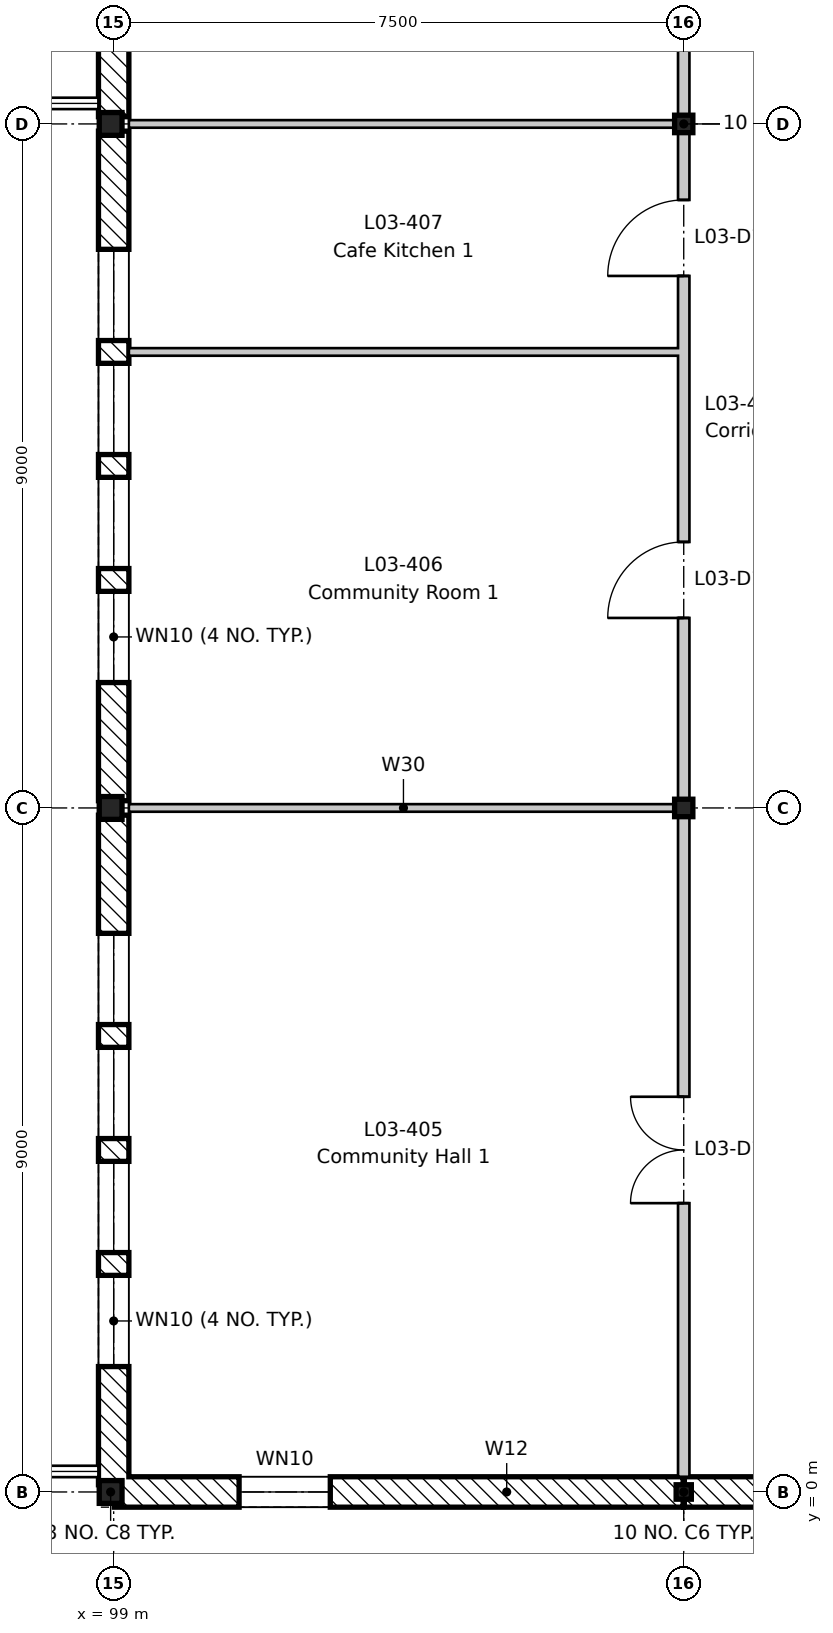
"""IFC4 building model, lengths in metres.
Left out: names, types, materials, properties, quantities, classifications, styles, units other than length and angle.
Written with IfcOpenShell. Run it as: python <this file> out.ifc"""

import sys

from ifc_helpers import new_model, si_unit, direction, frame, frame_2d, origin, origin_2d, place, context, subcontext, project, spatial, rectangle, i_section, extrude, element, fill, save


model = new_model("IFC4")
c1 = context("Model", 3, precision=1e-05, world=origin(), true_north=direction((0.0, 1.0)))
c2 = subcontext(c1, "Body", "Model", "MODEL_VIEW")
j1 = project(units=[si_unit("LENGTHUNIT", "METRE"), si_unit("PLANEANGLEUNIT", "RADIAN")], contexts=[c1])
p1 = place(None, origin())
s1 = spatial("IfcSite", under=j1, at=p1, CompositionType="ELEMENT")
p2 = place(p1, origin())
s2 = spatial("IfcBuilding", under=s1, at=p2, CompositionType="ELEMENT")
p3 = place(p2, frame((0.0, 0.0, 14.4)))
s3 = spatial("IfcBuildingStorey", under=s2, at=p3, CompositionType="ELEMENT", Elevation=14.4)
for number, where, z_axis, x_axis in (
    (1, (99.0, 0.0, -0.2), (0.0, 0.0, 1.0), (1.0, 0.0, 0.0)),
    (2, (99.0, 9.0, -0.2), (0.0, 0.0, 1.0), (1.0, 0.0, 0.0)),
    (3, (99.0, 18.0, -0.2), (0.0, 0.0, 1.0), (1.0, 0.0, 0.0)),
    (4, (106.5, 0.0, -0.2), (0.0, 0.0, 1.0), (1.0, 0.0, 0.0)),
):
    element("IfcColumn", number, at=place(p3, frame(where, z_axis=z_axis, x_axis=x_axis)), inside=s3, PredefinedType="COLUMN", context=c2, shape_type="SweptSolid", body=[
        extrude(i_section(OverallWidth=0.2, OverallDepth=0.19, WebThickness=0.007, FlangeThickness=0.01, FilletRadius=0.018, at=origin_2d()), origin(), (0.0, 0.0, 1.0), 4.15),
    ])
for number, where, z_axis, x_axis in (
    (5, (106.5, 9.0, -0.2), (0.0, 0.0, 1.0), (1.0, 0.0, 0.0)),
    (6, (106.5, 18.0, -0.2), (0.0, 0.0, 1.0), (1.0, 0.0, 0.0)),
):
    element("IfcColumn", number, at=place(p3, frame(where, z_axis=z_axis, x_axis=x_axis)), inside=s3, PredefinedType="COLUMN", context=c2, shape_type="SweptSolid", body=[
        extrude(i_section(OverallWidth=0.24, OverallDepth=0.23, WebThickness=0.008, FlangeThickness=0.012, FilletRadius=0.021, at=origin_2d()), origin(), (0.0, 0.0, 1.0), 4.15),
    ])
for number, where, z_axis, x_axis in (
    (7, (98.96, 0.0, 3.95), (0.0, 0.0, 1.0), (1.0, 0.0, 0.0)),
    (8, (98.96, 9.0, 3.95), (0.0, 0.0, 1.0), (1.0, 0.0, 0.0)),
    (9, (98.96, 18.0, 3.95), (0.0, 0.0, 1.0), (1.0, 0.0, 0.0)),
):
    element("IfcColumn", number, at=place(p3, frame(where, z_axis=z_axis, x_axis=x_axis)), inside=s3, PredefinedType="COLUMN", context=c2, shape_type="SweptSolid", body=[
        extrude(i_section(OverallWidth=0.3, OverallDepth=0.3, WebThickness=0.011, FlangeThickness=0.019, FilletRadius=0.027, at=origin_2d()), origin(), (0.0, 0.0, 1.0), 0.25),
    ])
p4 = place(p3, frame((99.0, 0.095, 0.0), z_axis=(0.0, 0.0, 1.0), x_axis=(0.0, 1.0, 0.0)))
e10 = element("IfcWall", 10, at=p4, inside=s3, PredefinedType="STANDARD", context=c2, shape_type="SweptSolid", body=[
    extrude(rectangle(XDim=8.81, YDim=0.4, at=frame_2d((4.405, 0.0))), origin(), (0.0, 0.0, 1.0), 3.55),
])
p5 = place(p4, frame((1.555, 0.0, 0.6)))
e11 = element("IfcOpeningElement", 11, at=p5, cuts=e10, PredefinedType="OPENING", context=c2, shape_type="SweptSolid", body=[
    extrude(rectangle(XDim=1.2, YDim=1.8, at=frame_2d((0.6, 0.9))), frame((0.0, 0.21, 0.0), z_axis=(0.0, -1.0, 0.0), x_axis=(1.0, 0.0, 0.0)), (0.0, 0.0, 1.0), 0.42),
])
p6 = place(p4, frame((3.055, 0.0, 0.6)))
e12 = element("IfcOpeningElement", 12, at=p6, cuts=e10, PredefinedType="OPENING", context=c2, shape_type="SweptSolid", body=[
    extrude(rectangle(XDim=1.2, YDim=1.8, at=frame_2d((0.6, 0.9))), frame((0.0, 0.21, 0.0), z_axis=(0.0, -1.0, 0.0), x_axis=(1.0, 0.0, 0.0)), (0.0, 0.0, 1.0), 0.42),
])
p7 = place(p4, frame((4.555, 0.0, 0.6)))
e13 = element("IfcOpeningElement", 13, at=p7, cuts=e10, PredefinedType="OPENING", context=c2, shape_type="SweptSolid", body=[
    extrude(rectangle(XDim=1.2, YDim=1.8, at=frame_2d((0.6, 0.9))), frame((0.0, 0.21, 0.0), z_axis=(0.0, -1.0, 0.0), x_axis=(1.0, 0.0, 0.0)), (0.0, 0.0, 1.0), 0.42),
])
p8 = place(p4, frame((6.055, 0.0, 0.6)))
e14 = element("IfcOpeningElement", 14, at=p8, cuts=e10, PredefinedType="OPENING", context=c2, shape_type="SweptSolid", body=[
    extrude(rectangle(XDim=1.2, YDim=1.8, at=frame_2d((0.6, 0.9))), frame((0.0, 0.21, 0.0), z_axis=(0.0, -1.0, 0.0), x_axis=(1.0, 0.0, 0.0)), (0.0, 0.0, 1.0), 0.42),
])
p9 = place(p3, frame((99.0, 9.095, 0.0), z_axis=(0.0, 0.0, 1.0), x_axis=(0.0, 1.0, 0.0)))
e15 = element("IfcWall", 15, at=p9, inside=s3, PredefinedType="STANDARD", context=c2, shape_type="SweptSolid", body=[
    extrude(rectangle(XDim=8.81, YDim=0.4, at=frame_2d((4.405, 0.0))), origin(), (0.0, 0.0, 1.0), 3.55),
])
p10 = place(p9, frame((1.555, 0.0, 0.6)))
e16 = element("IfcOpeningElement", 16, at=p10, cuts=e15, PredefinedType="OPENING", context=c2, shape_type="SweptSolid", body=[
    extrude(rectangle(XDim=1.2, YDim=1.8, at=frame_2d((0.6, 0.9))), frame((0.0, 0.21, 0.0), z_axis=(0.0, -1.0, 0.0), x_axis=(1.0, 0.0, 0.0)), (0.0, 0.0, 1.0), 0.42),
])
p11 = place(p9, frame((3.055, 0.0, 0.6)))
e17 = element("IfcOpeningElement", 17, at=p11, cuts=e15, PredefinedType="OPENING", context=c2, shape_type="SweptSolid", body=[
    extrude(rectangle(XDim=1.2, YDim=1.8, at=frame_2d((0.6, 0.9))), frame((0.0, 0.21, 0.0), z_axis=(0.0, -1.0, 0.0), x_axis=(1.0, 0.0, 0.0)), (0.0, 0.0, 1.0), 0.42),
])
p12 = place(p9, frame((4.555, 0.0, 0.6)))
e18 = element("IfcOpeningElement", 18, at=p12, cuts=e15, PredefinedType="OPENING", context=c2, shape_type="SweptSolid", body=[
    extrude(rectangle(XDim=1.2, YDim=1.8, at=frame_2d((0.6, 0.9))), frame((0.0, 0.21, 0.0), z_axis=(0.0, -1.0, 0.0), x_axis=(1.0, 0.0, 0.0)), (0.0, 0.0, 1.0), 0.42),
])
p13 = place(p9, frame((6.055, 0.0, 0.6)))
e19 = element("IfcOpeningElement", 19, at=p13, cuts=e15, PredefinedType="OPENING", context=c2, shape_type="SweptSolid", body=[
    extrude(rectangle(XDim=1.2, YDim=1.8, at=frame_2d((0.6, 0.9))), frame((0.0, 0.21, 0.0), z_axis=(0.0, -1.0, 0.0), x_axis=(1.0, 0.0, 0.0)), (0.0, 0.0, 1.0), 0.42),
])
p14 = place(p3, frame((99.0, 18.095, 0.0), z_axis=(0.0, 0.0, 1.0), x_axis=(0.0, 1.0, 0.0)))
e20 = element("IfcWall", 20, at=p14, inside=s3, PredefinedType="STANDARD", context=c2, shape_type="SweptSolid", body=[
    extrude(rectangle(XDim=8.81, YDim=0.4, at=frame_2d((4.405, 0.0))), origin(), (0.0, 0.0, 1.0), 3.55),
])
p15 = place(p14, frame((1.555, 0.0, 0.6)))
e21 = element("IfcOpeningElement", 21, at=p15, cuts=e20, PredefinedType="OPENING", context=c2, shape_type="SweptSolid", body=[
    extrude(rectangle(XDim=1.2, YDim=1.8, at=frame_2d((0.6, 0.9))), frame((0.0, 0.21, 0.0), z_axis=(0.0, -1.0, 0.0), x_axis=(1.0, 0.0, 0.0)), (0.0, 0.0, 1.0), 0.42),
])
p16 = place(p14, frame((3.055, 0.0, 0.6)))
e22 = element("IfcOpeningElement", 22, at=p16, cuts=e20, PredefinedType="OPENING", context=c2, shape_type="SweptSolid", body=[
    extrude(rectangle(XDim=1.2, YDim=1.8, at=frame_2d((0.6, 0.9))), frame((0.0, 0.21, 0.0), z_axis=(0.0, -1.0, 0.0), x_axis=(1.0, 0.0, 0.0)), (0.0, 0.0, 1.0), 0.42),
])
p17 = place(p14, frame((4.555, 0.0, 0.6)))
e23 = element("IfcOpeningElement", 23, at=p17, cuts=e20, PredefinedType="OPENING", context=c2, shape_type="SweptSolid", body=[
    extrude(rectangle(XDim=1.2, YDim=1.8, at=frame_2d((0.6, 0.9))), frame((0.0, 0.21, 0.0), z_axis=(0.0, -1.0, 0.0), x_axis=(1.0, 0.0, 0.0)), (0.0, 0.0, 1.0), 0.42),
])
p18 = place(p14, frame((6.055, 0.0, 0.6)))
e24 = element("IfcOpeningElement", 24, at=p18, cuts=e20, PredefinedType="OPENING", context=c2, shape_type="SweptSolid", body=[
    extrude(rectangle(XDim=1.2, YDim=1.8, at=frame_2d((0.6, 0.9))), frame((0.0, 0.21, 0.0), z_axis=(0.0, -1.0, 0.0), x_axis=(1.0, 0.0, 0.0)), (0.0, 0.0, 1.0), 0.42),
])
p19 = place(p3, frame((106.492, 0.0, 0.0), z_axis=(0.0, 0.0, 1.0), x_axis=(-1.0, 0.0, 0.0)))
e25 = element("IfcWall", 25, at=p19, inside=s3, PredefinedType="STANDARD", context=c2, shape_type="SweptSolid", body=[
    extrude(rectangle(XDim=7.483, YDim=0.4, at=frame_2d((3.742, 0.0))), origin(), (0.0, 0.0, 1.0), 3.62),
])
p20 = place(p19, frame((4.642, 0.0, 0.6)))
e26 = element("IfcOpeningElement", 26, at=p20, cuts=e25, PredefinedType="OPENING", context=c2, shape_type="SweptSolid", body=[
    extrude(rectangle(XDim=1.2, YDim=1.8, at=frame_2d((0.6, 0.9))), frame((0.0, 0.21, 0.0), z_axis=(0.0, -1.0, 0.0), x_axis=(1.0, 0.0, 0.0)), (0.0, 0.0, 1.0), 0.42),
])
p21 = place(p3, frame((109.492, 0.0, 0.0), z_axis=(0.0, 0.0, 1.0), x_axis=(-1.0, 0.0, 0.0)))
e27 = element("IfcWall", 27, at=p21, inside=s3, PredefinedType="STANDARD", context=c2, shape_type="SweptSolid", body=[
    extrude(rectangle(XDim=2.983, YDim=0.4, at=frame_2d((1.492, 0.0))), origin(), (0.0, 0.0, 1.0), 3.75),
])
p22 = place(p3, frame((99.2, 9.0, 0.0), z_axis=(0.0, 0.0, 1.0), x_axis=(1.0, 0.0, 0.0)))
e28 = element("IfcWall", 28, at=p22, inside=s3, PredefinedType="PARTITIONING", context=c2, shape_type="SweptSolid", body=[
    extrude(rectangle(XDim=7.225, YDim=0.1, at=frame_2d((3.613, 0.0))), origin(), (0.0, 0.0, 1.0), 3.6),
])
p23 = place(p3, frame((99.2, 15.0, 0.0), z_axis=(0.0, 0.0, 1.0), x_axis=(1.0, 0.0, 0.0)))
e29 = element("IfcWall", 29, at=p23, inside=s3, PredefinedType="PARTITIONING", context=c2, shape_type="SweptSolid", body=[
    extrude(rectangle(XDim=7.225, YDim=0.1, at=frame_2d((3.613, 0.0))), origin(), (0.0, 0.0, 1.0), 3.95),
])
p24 = place(p3, frame((99.2, 18.0, 0.0), z_axis=(0.0, 0.0, 1.0), x_axis=(1.0, 0.0, 0.0)))
e30 = element("IfcWall", 30, at=p24, inside=s3, PredefinedType="PARTITIONING", context=c2, shape_type="SweptSolid", body=[
    extrude(rectangle(XDim=7.225, YDim=0.1, at=frame_2d((3.613, 0.0))), origin(), (0.0, 0.0, 1.0), 3.6),
])
p25 = place(p3, frame((106.5, 0.2, 0.0), z_axis=(0.0, 0.0, 1.0), x_axis=(0.0, 1.0, 0.0)))
e31 = element("IfcWall", 31, at=p25, inside=s3, PredefinedType="PARTITIONING", context=c2, shape_type="SweptSolid", body=[
    extrude(rectangle(XDim=53.6, YDim=0.15, at=frame_2d((26.8, 0.0))), origin(), (0.0, 0.0, 1.0), 3.43),
])
p26 = place(p25, frame((3.6, 0.0, 0.0)))
e32 = element("IfcOpeningElement", 32, at=p26, cuts=e31, PredefinedType="OPENING", context=c2, shape_type="SweptSolid", body=[
    extrude(rectangle(XDim=1.4, YDim=2.1, at=frame_2d((0.7, 1.05))), frame((0.0, 0.085, 0.0), z_axis=(0.0, -1.0, 0.0), x_axis=(1.0, 0.0, 0.0)), (0.0, 0.0, 1.0), 0.17),
])
p27 = place(p25, frame((11.3, 0.0, 0.0)))
e33 = element("IfcOpeningElement", 33, at=p27, cuts=e31, PredefinedType="OPENING", context=c2, shape_type="SweptSolid", body=[
    extrude(rectangle(XDim=1.0, YDim=2.1, at=frame_2d((0.5, 1.05))), frame((0.0, 0.085, 0.0), z_axis=(0.0, -1.0, 0.0), x_axis=(1.0, 0.0, 0.0)), (0.0, 0.0, 1.0), 0.17),
])
p28 = place(p25, frame((15.8, 0.0, 0.0)))
e34 = element("IfcOpeningElement", 34, at=p28, cuts=e31, PredefinedType="OPENING", context=c2, shape_type="SweptSolid", body=[
    extrude(rectangle(XDim=1.0, YDim=2.1, at=frame_2d((0.5, 1.05))), frame((0.0, 0.085, 0.0), z_axis=(0.0, -1.0, 0.0), x_axis=(1.0, 0.0, 0.0)), (0.0, 0.0, 1.0), 0.17),
])
p29 = place(p25, frame((21.6, 0.0, 0.0)))
e35 = element("IfcOpeningElement", 35, at=p29, cuts=e31, PredefinedType="OPENING", context=c2, shape_type="SweptSolid", body=[
    extrude(rectangle(XDim=1.4, YDim=2.1, at=frame_2d((0.7, 1.05))), frame((0.0, 0.085, 0.0), z_axis=(0.0, -1.0, 0.0), x_axis=(1.0, 0.0, 0.0)), (0.0, 0.0, 1.0), 0.17),
])
p30 = place(p25, frame((29.3, 0.0, 0.0)))
e36 = element("IfcOpeningElement", 36, at=p30, cuts=e31, PredefinedType="OPENING", context=c2, shape_type="SweptSolid", body=[
    extrude(rectangle(XDim=1.0, YDim=2.1, at=frame_2d((0.5, 1.05))), frame((0.0, 0.085, 0.0), z_axis=(0.0, -1.0, 0.0), x_axis=(1.0, 0.0, 0.0)), (0.0, 0.0, 1.0), 0.17),
])
p31 = place(p25, frame((36.6, 0.0, 0.0)))
e37 = element("IfcOpeningElement", 37, at=p31, cuts=e31, PredefinedType="OPENING", context=c2, shape_type="SweptSolid", body=[
    extrude(rectangle(XDim=1.4, YDim=2.1, at=frame_2d((0.7, 1.05))), frame((0.0, 0.085, 0.0), z_axis=(0.0, -1.0, 0.0), x_axis=(1.0, 0.0, 0.0)), (0.0, 0.0, 1.0), 0.17),
])
p32 = place(p25, frame((45.55, 0.0, 0.0)))
e38 = element("IfcOpeningElement", 38, at=p32, cuts=e31, PredefinedType="OPENING", context=c2, shape_type="SweptSolid", body=[
    extrude(rectangle(XDim=1.0, YDim=2.1, at=frame_2d((0.5, 1.05))), frame((0.0, 0.085, 0.0), z_axis=(0.0, -1.0, 0.0), x_axis=(1.0, 0.0, 0.0)), (0.0, 0.0, 1.0), 0.17),
])
p33 = place(p25, frame((48.8, 0.0, 0.0)))
e39 = element("IfcOpeningElement", 39, at=p33, cuts=e31, PredefinedType="OPENING", context=c2, shape_type="SweptSolid", body=[
    extrude(rectangle(XDim=1.0, YDim=2.1, at=frame_2d((0.5, 1.05))), frame((0.0, 0.085, 0.0), z_axis=(0.0, -1.0, 0.0), x_axis=(1.0, 0.0, 0.0)), (0.0, 0.0, 1.0), 0.17),
])
p34 = place(p25, frame((51.8, 0.0, 0.0)))
e40 = element("IfcOpeningElement", 40, at=p34, cuts=e31, PredefinedType="OPENING", context=c2, shape_type="SweptSolid", body=[
    extrude(rectangle(XDim=1.0, YDim=2.1, at=frame_2d((0.5, 1.05))), frame((0.0, 0.085, 0.0), z_axis=(0.0, -1.0, 0.0), x_axis=(1.0, 0.0, 0.0)), (0.0, 0.0, 1.0), 0.17),
])
p35 = place(p5, origin())
e41 = element("IfcWindow", 41, at=p35, inside=s3, PartitioningType="SINGLE_PANEL", PredefinedType="WINDOW", context=c2, shape_type="SweptSolid", body=[
    extrude(rectangle(XDim=1.2, YDim=1.8, at=frame_2d((0.6, 0.9))), frame((0.0, 0.03, 0.0), z_axis=(0.0, -1.0, 0.0), x_axis=(1.0, 0.0, 0.0)), (0.0, 0.0, 1.0), 0.06),
])
fill(e11, e41)
p36 = place(p6, origin())
e42 = element("IfcWindow", 42, at=p36, inside=s3, PartitioningType="SINGLE_PANEL", PredefinedType="WINDOW", context=c2, shape_type="SweptSolid", body=[
    extrude(rectangle(XDim=1.2, YDim=1.8, at=frame_2d((0.6, 0.9))), frame((0.0, 0.03, 0.0), z_axis=(0.0, -1.0, 0.0), x_axis=(1.0, 0.0, 0.0)), (0.0, 0.0, 1.0), 0.06),
])
fill(e12, e42)
p37 = place(p7, origin())
e43 = element("IfcWindow", 43, at=p37, inside=s3, PartitioningType="SINGLE_PANEL", PredefinedType="WINDOW", context=c2, shape_type="SweptSolid", body=[
    extrude(rectangle(XDim=1.2, YDim=1.8, at=frame_2d((0.6, 0.9))), frame((0.0, 0.03, 0.0), z_axis=(0.0, -1.0, 0.0), x_axis=(1.0, 0.0, 0.0)), (0.0, 0.0, 1.0), 0.06),
])
fill(e13, e43)
p38 = place(p8, origin())
e44 = element("IfcWindow", 44, at=p38, inside=s3, PartitioningType="SINGLE_PANEL", PredefinedType="WINDOW", context=c2, shape_type="SweptSolid", body=[
    extrude(rectangle(XDim=1.2, YDim=1.8, at=frame_2d((0.6, 0.9))), frame((0.0, 0.03, 0.0), z_axis=(0.0, -1.0, 0.0), x_axis=(1.0, 0.0, 0.0)), (0.0, 0.0, 1.0), 0.06),
])
fill(e14, e44)
p39 = place(p10, origin())
e45 = element("IfcWindow", 45, at=p39, inside=s3, PartitioningType="SINGLE_PANEL", PredefinedType="WINDOW", context=c2, shape_type="SweptSolid", body=[
    extrude(rectangle(XDim=1.2, YDim=1.8, at=frame_2d((0.6, 0.9))), frame((0.0, 0.03, 0.0), z_axis=(0.0, -1.0, 0.0), x_axis=(1.0, 0.0, 0.0)), (0.0, 0.0, 1.0), 0.06),
])
fill(e16, e45)
p40 = place(p11, origin())
e46 = element("IfcWindow", 46, at=p40, inside=s3, PartitioningType="SINGLE_PANEL", PredefinedType="WINDOW", context=c2, shape_type="SweptSolid", body=[
    extrude(rectangle(XDim=1.2, YDim=1.8, at=frame_2d((0.6, 0.9))), frame((0.0, 0.03, 0.0), z_axis=(0.0, -1.0, 0.0), x_axis=(1.0, 0.0, 0.0)), (0.0, 0.0, 1.0), 0.06),
])
fill(e17, e46)
p41 = place(p12, origin())
e47 = element("IfcWindow", 47, at=p41, inside=s3, PartitioningType="SINGLE_PANEL", PredefinedType="WINDOW", context=c2, shape_type="SweptSolid", body=[
    extrude(rectangle(XDim=1.2, YDim=1.8, at=frame_2d((0.6, 0.9))), frame((0.0, 0.03, 0.0), z_axis=(0.0, -1.0, 0.0), x_axis=(1.0, 0.0, 0.0)), (0.0, 0.0, 1.0), 0.06),
])
fill(e18, e47)
p42 = place(p13, origin())
e48 = element("IfcWindow", 48, at=p42, inside=s3, PartitioningType="SINGLE_PANEL", PredefinedType="WINDOW", context=c2, shape_type="SweptSolid", body=[
    extrude(rectangle(XDim=1.2, YDim=1.8, at=frame_2d((0.6, 0.9))), frame((0.0, 0.03, 0.0), z_axis=(0.0, -1.0, 0.0), x_axis=(1.0, 0.0, 0.0)), (0.0, 0.0, 1.0), 0.06),
])
fill(e19, e48)
p43 = place(p20, origin())
e49 = element("IfcWindow", 49, at=p43, inside=s3, PartitioningType="SINGLE_PANEL", PredefinedType="WINDOW", context=c2, shape_type="SweptSolid", body=[
    extrude(rectangle(XDim=1.2, YDim=1.8, at=frame_2d((0.6, 0.9))), frame((0.0, 0.03, 0.0), z_axis=(0.0, -1.0, 0.0), x_axis=(1.0, 0.0, 0.0)), (0.0, 0.0, 1.0), 0.06),
])
fill(e26, e49)
p44 = place(p26, origin())
e50 = element("IfcDoor", 50, at=p44, inside=s3, OperationType="DOUBLE_DOOR_SINGLE_SWING", PredefinedType="DOOR", context=c2, shape_type="SweptSolid", body=[
    extrude(rectangle(XDim=1.4, YDim=2.1, at=frame_2d((0.7, 1.05))), frame((0.0, 0.025, 0.0), z_axis=(0.0, -1.0, 0.0), x_axis=(1.0, 0.0, 0.0)), (0.0, 0.0, 1.0), 0.05),
])
fill(e32, e50)
p45 = place(p27, origin())
e51 = element("IfcDoor", 51, at=p45, inside=s3, OperationType="SINGLE_SWING_LEFT", PredefinedType="DOOR", context=c2, shape_type="SweptSolid", body=[
    extrude(rectangle(XDim=1.0, YDim=2.1, at=frame_2d((0.5, 1.05))), frame((0.0, 0.025, 0.0), z_axis=(0.0, -1.0, 0.0), x_axis=(1.0, 0.0, 0.0)), (0.0, 0.0, 1.0), 0.05),
])
fill(e33, e51)
p46 = place(p28, origin())
e52 = element("IfcDoor", 52, at=p46, inside=s3, OperationType="SINGLE_SWING_LEFT", PredefinedType="DOOR", context=c2, shape_type="SweptSolid", body=[
    extrude(rectangle(XDim=1.0, YDim=2.1, at=frame_2d((0.5, 1.05))), frame((0.0, 0.025, 0.0), z_axis=(0.0, -1.0, 0.0), x_axis=(1.0, 0.0, 0.0)), (0.0, 0.0, 1.0), 0.05),
])
fill(e34, e52)
save(model, sys.argv[1])
